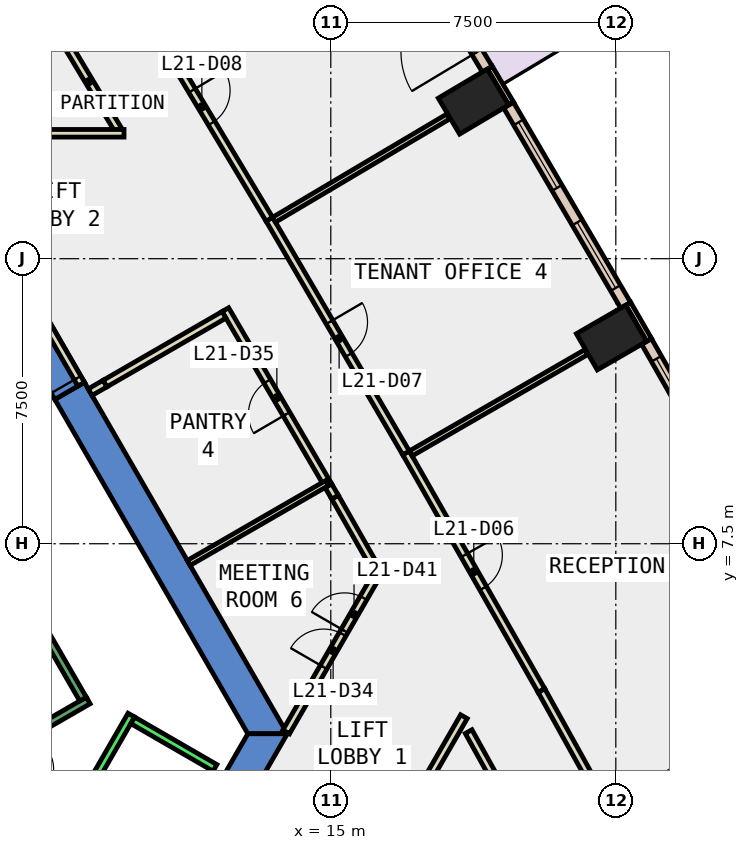
"""IFC4 building model, lengths in metres.
Left out: names, types, materials, properties, quantities, classifications, styles, units other than length and angle.
Written with IfcOpenShell. Run it as: python <this file> out.ifc"""

import sys

from ifc_helpers import new_model, si_unit, direction, frame, frame_2d, origin, origin_2d, place, context, subcontext, project, spatial, polyline, rectangle, outline, extrude, element, fill, save


model = new_model("IFC4")
c1 = context("Model", 3, precision=1e-05, world=origin(), true_north=direction((0.0, 1.0)))
c2 = subcontext(c1, "Body", "Model", "MODEL_VIEW")
j1 = project(units=[si_unit("LENGTHUNIT", "METRE"), si_unit("PLANEANGLEUNIT", "RADIAN")], contexts=[c1])
p1 = place(None, origin())
s1 = spatial("IfcSite", under=j1, at=p1, CompositionType="ELEMENT")
p2 = place(p1, origin())
s2 = spatial("IfcBuilding", under=s1, at=p2, CompositionType="ELEMENT")
p3 = place(p2, frame((0.0, 0.0, 99.2)))
s3 = spatial("IfcBuildingStorey", under=s2, at=p3, CompositionType="ELEMENT", Elevation=99.2)
for number, where, z_axis, x_axis in (
    (1, (22.387, 12.925, -0.4), (0.0, 0.0, 1.0), (-0.5, 0.866, 0.0)),
    (2, (18.755, 19.134, -0.4), (0.0, 0.0, 1.0), (-0.51, 0.86, 0.0)),
):
    element("IfcColumn", number, at=place(p3, frame(where, z_axis=z_axis, x_axis=x_axis)), inside=s3, PredefinedType="COLUMN", context=c2, shape_type="SweptSolid", body=[
        extrude(rectangle(XDim=1.1, YDim=1.5, at=origin_2d()), origin(), (0.0, 0.0, 1.0), 4.2),
    ])
p4 = place(p3, frame((0.0, 0.0, -0.4)))
e3 = element("IfcWall", 3, at=p4, inside=s3, PredefinedType="SHEAR", context=c2, shape_type="SweptSolid", body=[
    extrude(outline(polyline([(8.517, 11.748), (7.738, 11.298), (12.817, 2.5), (13.856, 2.5), (8.517, 11.748)])), origin(), (0.0, 0.0, 1.0), 4.2),
])
p5 = place(p3, frame((0.0, 0.0, 3.6)))
e4 = element("IfcWall", 4, at=p5, inside=s3, PredefinedType="SHEAR", context=c2, shape_type="SweptSolid", body=[
    extrude(outline(polyline([(7.517, 13.48), (6.738, 13.03), (7.738, 11.298), (8.517, 11.748), (7.517, 13.48)])), origin(), (0.0, 0.0, 1.0), 0.2),
])
p6 = place(p3, frame((0.0, 0.0, -0.4)))
e5 = element("IfcWall", 5, at=p6, inside=s3, PredefinedType="SHEAR", context=c2, shape_type="SweptSolid", body=[
    extrude(outline(polyline([(11.888, 0.89), (12.667, 0.44), (13.856, 2.5), (12.817, 2.5), (11.888, 0.89)])), origin(), (0.0, 0.0, 1.0), 4.2),
])
p7 = place(p3, frame((23.376, 12.861, 0.0), z_axis=(0.0, 0.0, 1.0), x_axis=(-0.499933745558, 0.866063652425, 0.0)))
e6 = element("IfcWall", 6, at=p7, inside=s3, PredefinedType="STANDARD", context=c2, shape_type="SweptSolid", body=[
    extrude(rectangle(XDim=1.1, YDim=0.15, at=frame_2d((0.55, 0.0))), origin(), (0.0, 0.0, 1.0), 3.8),
])
p8 = place(p3, frame((19.745, 19.082, 0.0), z_axis=(0.0, 0.0, 1.0), x_axis=(-0.510082245696, 0.860125631885, 0.0)))
e7 = element("IfcWall", 7, at=p8, inside=s3, PredefinedType="STANDARD", context=c2, shape_type="SweptSolid", body=[
    extrude(rectangle(XDim=1.1, YDim=0.15, at=frame_2d((0.55, 0.0))), origin(), (0.0, 0.0, 1.0), 3.8),
])
p9 = place(p3, frame((26.33, 7.52, 0.0), z_axis=(0.0, 0.0, 1.0), x_axis=(-0.495113375427, 0.868828375154, 0.0)))
e8 = element("IfcWall", 8, at=p9, inside=s3, PredefinedType="STANDARD", context=c2, shape_type="SweptSolid", body=[
    extrude(rectangle(XDim=6.104, YDim=0.3, at=frame_2d((3.052, 0.0))), origin(), (0.0, 0.0, 1.0), 3.8),
])
p10 = place(p9, frame((0.526, 0.0, 0.9)))
e9 = element("IfcOpeningElement", 9, at=p10, cuts=e8, PredefinedType="OPENING", context=c2, shape_type="SweptSolid", body=[
    extrude(rectangle(XDim=2.0, YDim=2.6, at=frame_2d((1.0, 1.3))), frame((0.0, 0.16, 0.0), z_axis=(0.0, -1.0, 0.0), x_axis=(1.0, 0.0, 0.0)), (0.0, 0.0, 1.0), 0.32),
])
p11 = place(p9, frame((3.578, 0.0, 0.9)))
e10 = element("IfcOpeningElement", 10, at=p11, cuts=e8, PredefinedType="OPENING", context=c2, shape_type="SweptSolid", body=[
    extrude(rectangle(XDim=2.0, YDim=2.6, at=frame_2d((1.0, 1.3))), frame((0.0, 0.16, 0.0), z_axis=(0.0, -1.0, 0.0), x_axis=(1.0, 0.0, 0.0)), (0.0, 0.0, 1.0), 0.32),
])
p12 = place(p3, frame((22.759, 13.774, 0.0), z_axis=(0.0, 0.0, 1.0), x_axis=(-0.50490018297, 0.863177736759, 0.0)))
e11 = element("IfcWall", 11, at=p12, inside=s3, PredefinedType="STANDARD", context=c2, shape_type="SweptSolid", body=[
    extrude(rectangle(XDim=6.104, YDim=0.3, at=frame_2d((3.052, 0.0))), origin(), (0.0, 0.0, 1.0), 3.8),
])
p13 = place(p12, frame((0.526, 0.0, 0.9)))
e12 = element("IfcOpeningElement", 12, at=p13, cuts=e11, PredefinedType="OPENING", context=c2, shape_type="SweptSolid", body=[
    extrude(rectangle(XDim=2.0, YDim=2.6, at=frame_2d((1.0, 1.3))), frame((0.0, 0.16, 0.0), z_axis=(0.0, -1.0, 0.0), x_axis=(1.0, 0.0, 0.0)), (0.0, 0.0, 1.0), 0.32),
])
p14 = place(p12, frame((3.578, 0.0, 0.9)))
e13 = element("IfcOpeningElement", 13, at=p14, cuts=e11, PredefinedType="OPENING", context=c2, shape_type="SweptSolid", body=[
    extrude(rectangle(XDim=2.0, YDim=2.6, at=frame_2d((1.0, 1.3))), frame((0.0, 0.16, 0.0), z_axis=(0.0, -1.0, 0.0), x_axis=(1.0, 0.0, 0.0)), (0.0, 0.0, 1.0), 0.32),
])
p15 = place(p3, frame((19.117, 19.987, 0.0), z_axis=(0.0, 0.0, 1.0), x_axis=(-0.514560454873, 0.857454102726, 0.0)))
e14 = element("IfcWall", 14, at=p15, inside=s3, PredefinedType="STANDARD", context=c2, shape_type="SweptSolid", body=[
    extrude(rectangle(XDim=6.104, YDim=0.3, at=frame_2d((3.052, 0.0))), origin(), (0.0, 0.0, 1.0), 3.8),
])
p16 = place(p15, frame((0.526, 0.0, 0.0)))
e15 = element("IfcOpeningElement", 15, at=p16, cuts=e14, PredefinedType="OPENING", context=c2, shape_type="SweptSolid", body=[
    extrude(rectangle(XDim=2.0, YDim=2.4, at=frame_2d((1.0, 1.2))), frame((0.0, 0.16, 0.0), z_axis=(0.0, -1.0, 0.0), x_axis=(1.0, 0.0, 0.0)), (0.0, 0.0, 1.0), 0.32),
])
p17 = place(p15, frame((3.578, 0.0, 0.9)))
e16 = element("IfcOpeningElement", 16, at=p17, cuts=e14, PredefinedType="OPENING", context=c2, shape_type="SweptSolid", body=[
    extrude(rectangle(XDim=2.0, YDim=2.6, at=frame_2d((1.0, 1.3))), frame((0.0, 0.16, 0.0), z_axis=(0.0, -1.0, 0.0), x_axis=(1.0, 0.0, 0.0)), (0.0, 0.0, 1.0), 0.32),
])
p18 = place(p3, frame((16.195, 6.824, 0.0), z_axis=(0.0, 0.0, 1.0), x_axis=(-0.494984897559, 0.868901577388, 0.0)))
e17 = element("IfcWall", 17, at=p18, inside=s3, PredefinedType="PARTITIONING", context=c2, shape_type="SweptSolid", body=[
    extrude(rectangle(XDim=2.188, YDim=0.2, at=frame_2d((1.094, 0.0))), origin(), (0.0, 0.0, 1.0), 3.8),
])
p19 = place(p3, frame((15.112, 8.725, 0.0), z_axis=(0.0, 0.0, 1.0), x_axis=(-0.50443330283, 0.86345066043, 0.0)))
e18 = element("IfcWall", 18, at=p19, inside=s3, PredefinedType="PARTITIONING", context=c2, shape_type="SweptSolid", body=[
    extrude(rectangle(XDim=0.351, YDim=0.2, at=frame_2d((0.175, 0.0))), origin(), (0.0, 0.0, 1.0), 3.8),
])
p20 = place(p3, frame((14.935, 9.028, 0.0), z_axis=(0.0, 0.0, 1.0), x_axis=(-0.504934493304, 0.863157666636, 0.0)))
e19 = element("IfcWall", 19, at=p20, inside=s3, PredefinedType="PARTITIONING", context=c2, shape_type="SweptSolid", body=[
    extrude(rectangle(XDim=5.365, YDim=0.2, at=frame_2d((2.683, 0.0))), origin(), (0.0, 0.0, 1.0), 3.8),
])
p21 = place(p20, frame((2.182, 0.0, 0.0)))
e20 = element("IfcOpeningElement", 20, at=p21, cuts=e19, PredefinedType="OPENING", context=c2, shape_type="SweptSolid", body=[
    extrude(rectangle(XDim=1.0, YDim=2.1, at=frame_2d((0.5, 1.05))), frame((0.0, 0.11, 0.0), z_axis=(0.0, -1.0, 0.0), x_axis=(1.0, 0.0, 0.0)), (0.0, 0.0, 1.0), 0.22),
])
p22 = place(p3, frame((12.19, 13.522, 0.0), z_axis=(0.0, 0.0, 1.0), x_axis=(-0.866000156139, -0.500043727655, 0.0)))
e21 = element("IfcWall", 21, at=p22, inside=s3, PredefinedType="PARTITIONING", context=c2, shape_type="SweptSolid", body=[
    extrude(rectangle(XDim=3.618, YDim=0.2, at=frame_2d((1.809, 0.0))), origin(), (0.0, 0.0, 1.0), 3.8),
])
p23 = place(p3, frame((9.407, 18.386, 0.0), z_axis=(0.0, 0.0, 1.0), x_axis=(-0.514399309837, 0.857550785691, 0.0)))
e22 = element("IfcWall", 22, at=p23, inside=s3, PredefinedType="PARTITIONING", context=c2, shape_type="SweptSolid", body=[
    extrude(rectangle(XDim=2.978, YDim=0.2, at=frame_2d((1.489, 0.0))), origin(), (0.0, 0.0, 1.0), 3.8),
])
p24 = place(p3, frame((22.071, -3.65, 0.0), z_axis=(0.0, 0.0, 1.0), x_axis=(-0.485198988697, 0.874403763354, 0.0)))
e23 = element("IfcWall", 23, at=p24, inside=s3, PredefinedType="PARTITIONING", context=c2, shape_type="SweptSolid", body=[
    extrude(rectangle(XDim=7.098, YDim=0.2, at=frame_2d((3.549, 0.0))), origin(), (0.0, 0.0, 1.0), 3.8),
])
p25 = place(p24, frame((3.049, 0.0, 0.0)))
e24 = element("IfcOpeningElement", 24, at=p25, cuts=e23, PredefinedType="OPENING", context=c2, shape_type="SweptSolid", body=[
    extrude(rectangle(XDim=1.0, YDim=2.1, at=frame_2d((0.5, 1.05))), frame((0.0, 0.11, 0.0), z_axis=(0.0, -1.0, 0.0), x_axis=(1.0, 0.0, 0.0)), (0.0, 0.0, 1.0), 0.22),
])
p26 = place(p3, frame((16.98, 9.89, 0.0), z_axis=(0.0, 0.0, 1.0), x_axis=(0.495123170501, -0.868822793228, 0.0)))
e25 = element("IfcWall", 25, at=p26, inside=s3, PredefinedType="PARTITIONING", context=c2, shape_type="SweptSolid", body=[
    extrude(rectangle(XDim=7.198, YDim=0.2, at=frame_2d((3.599, 0.0))), origin(), (0.0, 0.0, 1.0), 3.8),
])
p27 = place(p26, frame((3.099, 0.0, 0.0)))
e26 = element("IfcOpeningElement", 26, at=p27, cuts=e25, PredefinedType="OPENING", context=c2, shape_type="SweptSolid", body=[
    extrude(rectangle(XDim=1.0, YDim=2.1, at=frame_2d((0.5, 1.05))), frame((0.0, 0.11, 0.0), z_axis=(0.0, -1.0, 0.0), x_axis=(1.0, 0.0, 0.0)), (0.0, 0.0, 1.0), 0.22),
])
p28 = place(p3, frame((20.544, 3.636, 0.0), z_axis=(0.0, 0.0, 1.0), x_axis=(0.485250552989, -0.874375148792, 0.0)))
e27 = element("IfcWall", 27, at=p28, inside=s3, PredefinedType="PARTITIONING", context=c2, shape_type="SweptSolid", body=[
    extrude(rectangle(XDim=3.487, YDim=0.2, at=frame_2d((1.744, 0.0))), origin(), (0.0, 0.0, 1.0), 3.8),
])
p29 = place(p3, frame((13.383, 16.039, 0.0), z_axis=(0.0, 0.0, 1.0), x_axis=(0.504806221623, -0.863232690884, 0.0)))
e28 = element("IfcWall", 28, at=p29, inside=s3, PredefinedType="PARTITIONING", context=c2, shape_type="SweptSolid", body=[
    extrude(rectangle(XDim=7.124, YDim=0.2, at=frame_2d((3.562, 0.0))), origin(), (0.0, 0.0, 1.0), 3.8),
])
p30 = place(p29, frame((3.137, 0.0, 0.0)))
e29 = element("IfcOpeningElement", 29, at=p30, cuts=e28, PredefinedType="OPENING", context=c2, shape_type="SweptSolid", body=[
    extrude(rectangle(XDim=1.0, YDim=2.1, at=frame_2d((0.5, 1.05))), frame((0.0, 0.11, 0.0), z_axis=(0.0, -1.0, 0.0), x_axis=(1.0, 0.0, 0.0)), (0.0, 0.0, 1.0), 0.22),
])
p31 = place(p3, frame((9.755, 22.082, 0.0), z_axis=(0.0, 0.0, 1.0), x_axis=(0.514582342012, -0.857440967816, 0.0)))
e30 = element("IfcWall", 30, at=p31, inside=s3, PredefinedType="PARTITIONING", context=c2, shape_type="SweptSolid", body=[
    extrude(rectangle(XDim=7.049, YDim=0.2, at=frame_2d((3.524, 0.0))), origin(), (0.0, 0.0, 1.0), 3.8),
])
p32 = place(p31, frame((3.1, 0.0, 0.0)))
e31 = element("IfcOpeningElement", 31, at=p32, cuts=e30, PredefinedType="OPENING", context=c2, shape_type="SweptSolid", body=[
    extrude(rectangle(XDim=1.0, YDim=2.1, at=frame_2d((0.5, 1.05))), frame((0.0, 0.11, 0.0), z_axis=(0.0, -1.0, 0.0), x_axis=(1.0, 0.0, 0.0)), (0.0, 0.0, 1.0), 0.22),
])
p33 = place(p3, frame((6.25, 1.894, 0.0), z_axis=(0.0, 0.0, 1.0), x_axis=(0.866043184279, -0.499969202016, 0.0)))
e32 = element("IfcWall", 32, at=p33, inside=s3, PredefinedType="PARTITIONING", context=c2, shape_type="SweptSolid", body=[
    extrude(rectangle(XDim=2.084, YDim=0.2, at=frame_2d((1.042, 0.0))), origin(), (0.0, 0.0, 1.0), 3.8),
])
p34 = place(p33, frame((0.642, 0.0, 0.0)))
e33 = element("IfcOpeningElement", 33, at=p34, cuts=e32, PredefinedType="OPENING", context=c2, shape_type="SweptSolid", body=[
    extrude(rectangle(XDim=0.9, YDim=2.1, at=frame_2d((0.45, 1.05))), frame((0.0, 0.11, 0.0), z_axis=(0.0, -1.0, 0.0), x_axis=(1.0, 0.0, 0.0)), (0.0, 0.0, 1.0), 0.22),
])
p35 = place(p3, frame((11.261, 6.994, 0.0), z_axis=(0.0, 0.0, 1.0), x_axis=(0.866037428454, 0.499979172084, 0.0)))
e34 = element("IfcWall", 34, at=p35, inside=s3, PredefinedType="PARTITIONING", context=c2, shape_type="SweptSolid", body=[
    extrude(rectangle(XDim=4.198, YDim=0.15, at=frame_2d((2.099, 0.0))), origin(), (0.0, 0.0, 1.0), 3.8),
])
p36 = place(p3, frame((13.827, 2.55, 0.0), z_axis=(0.0, 0.0, 1.0), x_axis=(0.500070719615, 0.865984569946, 0.0)))
e35 = element("IfcWall", 35, at=p36, inside=s3, PredefinedType="PARTITIONING", context=c2, shape_type="SweptSolid", body=[
    extrude(rectangle(XDim=4.935, YDim=0.2, at=frame_2d((2.468, 0.0))), origin(), (0.0, 0.0, 1.0), 3.8),
])
p37 = place(p36, frame((1.968, 0.0, 0.0)))
e36 = element("IfcOpeningElement", 36, at=p37, cuts=e35, PredefinedType="OPENING", context=c2, shape_type="SweptSolid", body=[
    extrude(rectangle(XDim=1.0, YDim=2.1, at=frame_2d((0.5, 1.05))), frame((0.0, 0.11, 0.0), z_axis=(0.0, -1.0, 0.0), x_axis=(1.0, 0.0, 0.0)), (0.0, 0.0, 1.0), 0.22),
])
p38 = place(p36, frame((3.068, 0.0, 0.0)))
e37 = element("IfcOpeningElement", 37, at=p38, cuts=e35, PredefinedType="OPENING", context=c2, shape_type="SweptSolid", body=[
    extrude(rectangle(XDim=1.0, YDim=2.1, at=frame_2d((0.5, 1.05))), frame((0.0, 0.11, 0.0), z_axis=(0.0, -1.0, 0.0), x_axis=(1.0, 0.0, 0.0)), (0.0, 0.0, 1.0), 0.22),
])
p39 = place(p3, frame((18.503, 2.949, 0.0), z_axis=(0.0, 0.0, 1.0), x_axis=(-0.49997390151, -0.86604047123, 0.0)))
e38 = element("IfcWall", 38, at=p39, inside=s3, PredefinedType="PARTITIONING", context=c2, shape_type="SweptSolid", body=[
    extrude(rectangle(XDim=11.626, YDim=0.2, at=frame_2d((5.813, 0.0))), origin(), (0.0, 0.0, 1.0), 3.8),
])
p40 = place(p3, frame((22.185, 0.473, 0.0), z_axis=(0.0, 0.0, 1.0), x_axis=(0.874372498137, 0.485255329184, 0.0)))
e39 = element("IfcWall", 39, at=p40, inside=s3, PredefinedType="PARTITIONING", context=c2, shape_type="SweptSolid", body=[
    extrude(rectangle(XDim=6.9, YDim=0.15, at=frame_2d((3.45, 0.0))), origin(), (0.0, 0.0, 1.0), 3.8),
])
p41 = place(p3, frame((17.104, 9.875, 0.0), z_axis=(0.0, 0.0, 1.0), x_axis=(0.866024640963, 0.500001321243, 0.0)))
e40 = element("IfcWall", 40, at=p41, inside=s3, PredefinedType="PARTITIONING", context=c2, shape_type="SweptSolid", body=[
    extrude(rectangle(XDim=5.33, YDim=0.15, at=frame_2d((2.665, 0.0))), origin(), (0.0, 0.0, 1.0), 3.8),
])
p42 = place(p3, frame((13.507, 16.025, 0.0), z_axis=(0.0, 0.0, 1.0), x_axis=(0.860289301319, 0.509806157315, 0.0)))
e41 = element("IfcWall", 41, at=p42, inside=s3, PredefinedType="PARTITIONING", context=c2, shape_type="SweptSolid", body=[
    extrude(rectangle(XDim=5.33, YDim=0.15, at=frame_2d((2.665, 0.0))), origin(), (0.0, 0.0, 1.0), 3.8),
])
p43 = place(p3, frame((8.43, 11.698, 0.0), z_axis=(0.0, 0.0, 1.0), x_axis=(-0.50002537861, 0.866010750942, 0.0)))
e42 = element("IfcWall", 42, at=p43, inside=s3, PredefinedType="PARTITIONING", context=c2, shape_type="SweptSolid", body=[
    extrude(rectangle(XDim=2.0, YDim=0.2, at=frame_2d((1.0, 0.0))), origin(), (0.0, 0.0, 1.0), 2.4),
])
p44 = place(p43, frame((0.19, 0.0, 0.0)))
e43 = element("IfcOpeningElement", 43, at=p44, cuts=e42, PredefinedType="OPENING", context=c2, shape_type="SweptSolid", body=[
    extrude(rectangle(XDim=1.8, YDim=2.1, at=frame_2d((0.9, 1.05))), frame((0.0, 0.11, 0.0), z_axis=(0.0, -1.0, 0.0), x_axis=(1.0, 0.0, 0.0)), (0.0, 0.0, 1.0), 0.22),
])
p45 = place(p3, frame((0.4, 18.3, 0.0), z_axis=(0.0, 0.0, 1.0), x_axis=(1.0, 0.0, 0.0)))
e44 = element("IfcWall", 44, at=p45, inside=s3, PredefinedType="PARTITIONING", context=c2, shape_type="SweptSolid", body=[
    extrude(rectangle(XDim=9.159, YDim=0.2, at=frame_2d((4.58, 0.0))), origin(), (0.0, 0.0, 1.0), 3.8),
])
p46 = place(p3, frame((9.057, 11.713, 0.0), z_axis=(0.0, 0.0, 1.0), x_axis=(-0.866266849364, -0.49958157061, 0.0)))
e45 = element("IfcWall", 45, at=p46, inside=s3, PredefinedType="PARTITIONING", context=c2, shape_type="SweptSolid", body=[
    extrude(rectangle(XDim=0.45, YDim=0.2, at=frame_2d((0.225, 0.0))), origin(), (0.0, 0.0, 1.0), 2.4),
])
p47 = place(p3, frame((4.451, -6.19, 0.0), z_axis=(0.0, 0.0, 1.0), x_axis=(0.50000090737, 0.866024879913, 0.0)))
e46 = element("IfcWall", 46, at=p47, inside=s3, PredefinedType="STANDARD", context=c2, shape_type="SweptSolid", body=[
    extrude(rectangle(XDim=10.6, YDim=0.2, at=frame_2d((5.3, 0.0))), origin(), (0.0, 0.0, 1.0), 3.8),
])
p48 = place(p3, frame((9.788, 2.853, 0.0), z_axis=(0.0, 0.0, 1.0), x_axis=(0.865998541277, -0.500046524342, 0.0)))
e47 = element("IfcWall", 47, at=p48, inside=s3, PredefinedType="STANDARD", context=c2, shape_type="SweptSolid", body=[
    extrude(rectangle(XDim=2.5, YDim=0.2, at=frame_2d((1.25, 0.0))), origin(), (0.0, 0.0, 1.0), 3.8),
])
p49 = place(p3, frame((4.806, 1.176, 0.0), z_axis=(0.0, 0.0, 1.0), x_axis=(0.866059941101, 0.499940174841, 0.0)))
e48 = element("IfcWall", 48, at=p49, inside=s3, PredefinedType="STANDARD", context=c2, shape_type="SweptSolid", body=[
    extrude(rectangle(XDim=4.4, YDim=0.2, at=frame_2d((2.2, 0.0))), origin(), (0.0, 0.0, 1.0), 3.8),
])
p50 = place(p49, frame((1.65, 0.0, 0.0)))
e49 = element("IfcOpeningElement", 49, at=p50, cuts=e48, PredefinedType="OPENING", context=c2, shape_type="SweptSolid", body=[
    extrude(rectangle(XDim=1.1, YDim=2.2, at=frame_2d((0.55, 1.1))), frame((0.0, 0.11, 0.0), z_axis=(0.0, -1.0, 0.0), x_axis=(1.0, 0.0, 0.0)), (0.0, 0.0, 1.0), 0.22),
])
p51 = place(p3, frame((8.48, 3.412, 0.0), z_axis=(0.0, 0.0, 1.0), x_axis=(-0.499978703459, 0.866037698999, 0.0)))
e50 = element("IfcWall", 50, at=p51, inside=s3, PredefinedType="STANDARD", context=c2, shape_type="SweptSolid", body=[
    extrude(rectangle(XDim=6.9, YDim=0.2, at=frame_2d((3.45, 0.0))), origin(), (0.0, 0.0, 1.0), 3.8),
])
p52 = place(p11, origin())
e51 = element("IfcWindow", 51, at=p52, inside=s3, PartitioningType="SINGLE_PANEL", PredefinedType="WINDOW", context=c2, shape_type="SweptSolid", body=[
    extrude(rectangle(XDim=2.0, YDim=2.6, at=frame_2d((1.0, 1.3))), frame((0.0, 0.03, 0.0), z_axis=(0.0, -1.0, 0.0), x_axis=(1.0, 0.0, 0.0)), (0.0, 0.0, 1.0), 0.06),
])
fill(e10, e51)
p53 = place(p13, origin())
e52 = element("IfcWindow", 52, at=p53, inside=s3, PartitioningType="SINGLE_PANEL", PredefinedType="WINDOW", context=c2, shape_type="SweptSolid", body=[
    extrude(rectangle(XDim=2.0, YDim=2.6, at=frame_2d((1.0, 1.3))), frame((0.0, 0.03, 0.0), z_axis=(0.0, -1.0, 0.0), x_axis=(1.0, 0.0, 0.0)), (0.0, 0.0, 1.0), 0.06),
])
fill(e12, e52)
p54 = place(p14, origin())
e53 = element("IfcWindow", 53, at=p54, inside=s3, PartitioningType="SINGLE_PANEL", PredefinedType="WINDOW", context=c2, shape_type="SweptSolid", body=[
    extrude(rectangle(XDim=2.0, YDim=2.6, at=frame_2d((1.0, 1.3))), frame((0.0, 0.03, 0.0), z_axis=(0.0, -1.0, 0.0), x_axis=(1.0, 0.0, 0.0)), (0.0, 0.0, 1.0), 0.06),
])
fill(e13, e53)
p55 = place(p16, origin())
e54 = element("IfcDoor", 54, at=p55, inside=s3, OperationType="SLIDING_TO_LEFT", PredefinedType="DOOR", context=c2, shape_type="SweptSolid", body=[
    extrude(rectangle(XDim=2.0, YDim=2.4, at=frame_2d((1.0, 1.2))), frame((0.0, 0.025, 0.0), z_axis=(0.0, -1.0, 0.0), x_axis=(1.0, 0.0, 0.0)), (0.0, 0.0, 1.0), 0.05),
])
fill(e15, e54)
p56 = place(p27, origin())
e55 = element("IfcDoor", 55, at=p56, inside=s3, OperationType="SINGLE_SWING_LEFT", PredefinedType="DOOR", context=c2, shape_type="SweptSolid", body=[
    extrude(rectangle(XDim=1.0, YDim=2.1, at=frame_2d((0.5, 1.05))), frame((0.0, 0.025, 0.0), z_axis=(0.0, -1.0, 0.0), x_axis=(1.0, 0.0, 0.0)), (0.0, 0.0, 1.0), 0.05),
])
fill(e26, e55)
p57 = place(p30, origin())
e56 = element("IfcDoor", 56, at=p57, inside=s3, OperationType="SINGLE_SWING_LEFT", PredefinedType="DOOR", context=c2, shape_type="SweptSolid", body=[
    extrude(rectangle(XDim=1.0, YDim=2.1, at=frame_2d((0.5, 1.05))), frame((0.0, 0.025, 0.0), z_axis=(0.0, -1.0, 0.0), x_axis=(1.0, 0.0, 0.0)), (0.0, 0.0, 1.0), 0.05),
])
fill(e29, e56)
p58 = place(p32, origin())
e57 = element("IfcDoor", 57, at=p58, inside=s3, OperationType="SINGLE_SWING_LEFT", PredefinedType="DOOR", context=c2, shape_type="SweptSolid", body=[
    extrude(rectangle(XDim=1.0, YDim=2.1, at=frame_2d((0.5, 1.05))), frame((0.0, 0.025, 0.0), z_axis=(0.0, -1.0, 0.0), x_axis=(1.0, 0.0, 0.0)), (0.0, 0.0, 1.0), 0.05),
])
fill(e31, e57)
p59 = place(p37, origin())
e58 = element("IfcDoor", 58, at=p59, inside=s3, OperationType="SINGLE_SWING_LEFT", PredefinedType="DOOR", context=c2, shape_type="SweptSolid", body=[
    extrude(rectangle(XDim=1.0, YDim=2.1, at=frame_2d((0.5, 1.05))), frame((0.0, 0.025, 0.0), z_axis=(0.0, -1.0, 0.0), x_axis=(1.0, 0.0, 0.0)), (0.0, 0.0, 1.0), 0.05),
])
fill(e36, e58)
p60 = place(p21, origin())
e59 = element("IfcDoor", 59, at=p60, inside=s3, OperationType="SINGLE_SWING_LEFT", PredefinedType="DOOR", context=c2, shape_type="SweptSolid", body=[
    extrude(rectangle(XDim=1.0, YDim=2.1, at=frame_2d((0.5, 1.05))), frame((0.0, 0.025, 0.0), z_axis=(0.0, -1.0, 0.0), x_axis=(1.0, 0.0, 0.0)), (0.0, 0.0, 1.0), 0.05),
])
fill(e20, e59)
p61 = place(p38, origin())
e60 = element("IfcDoor", 60, at=p61, inside=s3, OperationType="SINGLE_SWING_RIGHT", PredefinedType="DOOR", context=c2, shape_type="SweptSolid", body=[
    extrude(rectangle(XDim=1.0, YDim=2.1, at=frame_2d((0.5, 1.05))), frame((0.0, 0.025, 0.0), z_axis=(0.0, -1.0, 0.0), x_axis=(1.0, 0.0, 0.0)), (0.0, 0.0, 1.0), 0.05),
])
fill(e37, e60)
p62 = place(p44, origin())
e61 = element("IfcDoor", 61, at=p62, inside=s3, OperationType="DOUBLE_DOOR_SINGLE_SWING", PredefinedType="DOOR", context=c2, shape_type="SweptSolid", body=[
    extrude(rectangle(XDim=1.8, YDim=2.1, at=frame_2d((0.9, 1.05))), frame((0.0, 0.025, 0.0), z_axis=(0.0, -1.0, 0.0), x_axis=(1.0, 0.0, 0.0)), (0.0, 0.0, 1.0), 0.05),
])
fill(e43, e61)
save(model, sys.argv[1])
